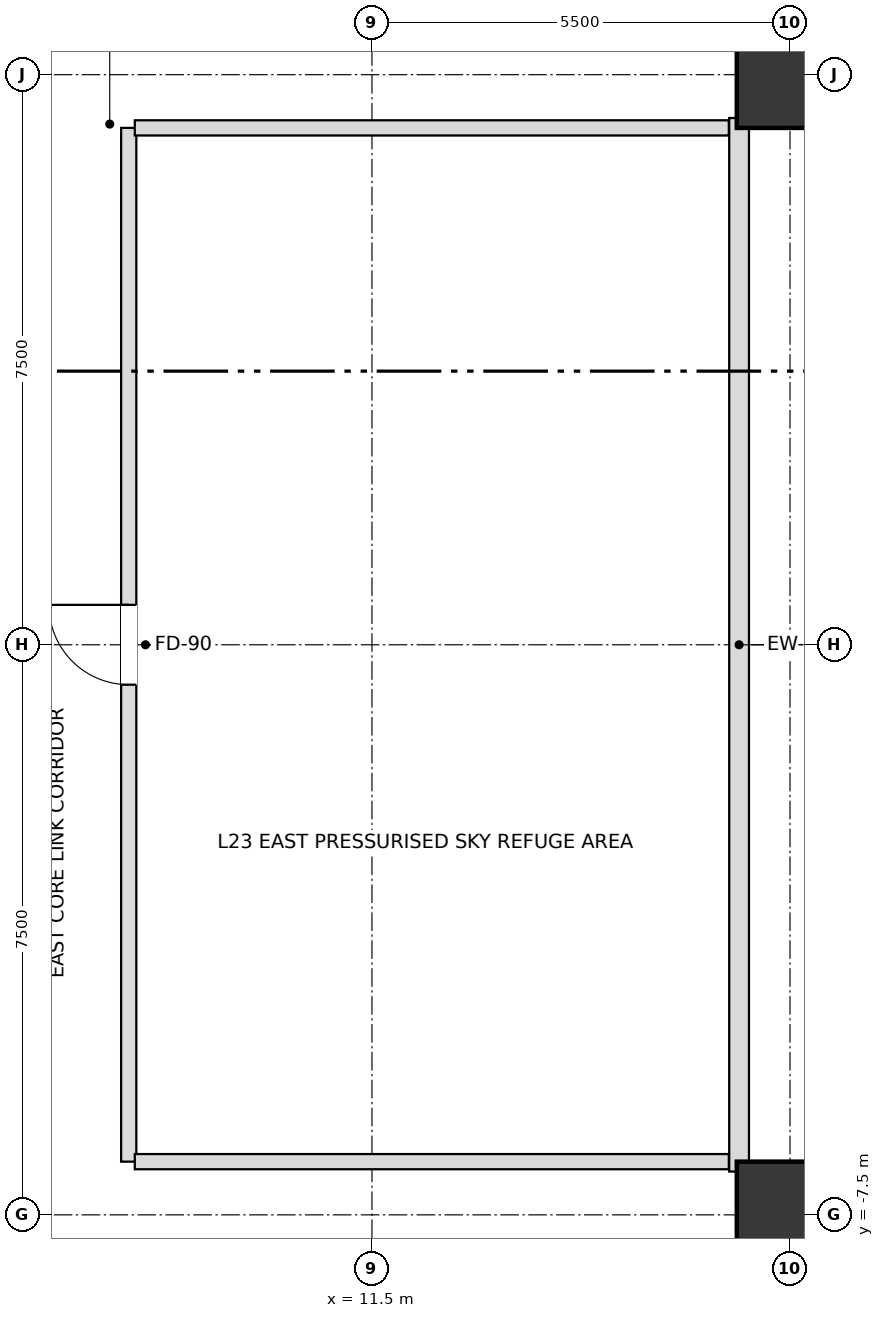
"""IFC4 building model, lengths in metres.
Left out: names, types, materials, properties, quantities, classifications, styles, units other than length and angle.
Written with IfcOpenShell. Run it as: python <this file> out.ifc"""

import sys

from ifc_helpers import new_model, si_unit, direction, frame, frame_2d, origin, origin_2d, place, context, subcontext, project, spatial, rectangle, extrude, element, fill, save


model = new_model("IFC4")
c1 = context("Model", 3, precision=1e-05, world=origin(), true_north=direction((0.0, 1.0)))
c2 = subcontext(c1, "Body", "Model", "MODEL_VIEW")
j1 = project(units=[si_unit("LENGTHUNIT", "METRE"), si_unit("PLANEANGLEUNIT", "RADIAN")], contexts=[c1])
p1 = place(None, origin())
s1 = spatial("IfcSite", under=j1, at=p1, CompositionType="ELEMENT")
p2 = place(p1, origin())
s2 = spatial("IfcBuilding", under=s1, at=p2, CompositionType="ELEMENT")
p3 = place(p2, frame((0.0, 0.0, 93.6)))
s3 = spatial("IfcBuildingStorey", under=s2, at=p3, CompositionType="ELEMENT", Elevation=93.6)
for number, where, z_axis, x_axis in (
    (1, (17.0, -7.5, 0.0), (0.0, 0.0, 1.0), (1.0, 0.0, 0.0)),
    (2, (17.0, 7.5, 0.0), (0.0, 0.0, 1.0), (1.0, 0.0, 0.0)),
):
    element("IfcColumn", number, at=place(p3, frame(where, z_axis=z_axis, x_axis=x_axis)), inside=s3, PredefinedType="USERDEFINED", context=c2, shape_type="SweptSolid", body=[
        extrude(rectangle(XDim=1.4, YDim=1.4, at=origin_2d()), origin(), (0.0, 0.0, 1.0), 5.4),
    ])
p4 = place(p3, frame((16.33, -6.93, 0.0), z_axis=(0.0, 0.0, 1.0), x_axis=(0.0, 1.0, 0.0)))
e3 = element("IfcWall", 3, at=p4, inside=s3, PredefinedType="SOLIDWALL", context=c2, shape_type="SweptSolid", body=[
    extrude(rectangle(XDim=13.86, YDim=0.26, at=frame_2d((6.93, 0.0))), origin(), (0.0, 0.0, 1.0), 5.1),
])
p5 = place(p3, frame((8.3, -6.8, 0.0), z_axis=(0.0, 0.0, 1.0), x_axis=(0.0, 1.0, 0.0)))
e4 = element("IfcWall", 4, at=p5, inside=s3, PredefinedType="SOLIDWALL", context=c2, shape_type="SweptSolid", body=[
    extrude(rectangle(XDim=13.6, YDim=0.2, at=frame_2d((6.8, 0.0))), origin(), (0.0, 0.0, 1.0), 5.1),
])
p6 = place(p5, frame((6.275, 0.0, 0.0)))
e5 = element("IfcOpeningElement", 5, at=p6, cuts=e4, PredefinedType="OPENING", context=c2, shape_type="SweptSolid", body=[
    extrude(rectangle(XDim=1.05, YDim=2.15, at=frame_2d((0.525, 1.075))), frame((0.0, 0.11, 0.0), z_axis=(0.0, -1.0, 0.0), x_axis=(1.0, 0.0, 0.0)), (0.0, 0.0, 1.0), 0.22),
])
for number, where, z_axis, x_axis in (
    (6, (8.38, -6.8, 0.0), (0.0, 0.0, 1.0), (1.0, 0.0, 0.0)),
    (7, (8.38, 6.8, 0.0), (0.0, 0.0, 1.0), (1.0, 0.0, 0.0)),
):
    element("IfcWall", number, at=place(p3, frame(where, z_axis=z_axis, x_axis=x_axis)), inside=s3, PredefinedType="SOLIDWALL", context=c2, shape_type="SweptSolid", body=[
        extrude(rectangle(XDim=7.815, YDim=0.2, at=frame_2d((3.908, 0.0))), origin(), (0.0, 0.0, 1.0), 5.1),
    ])
p7 = place(p6, origin())
e8 = element("IfcDoor", 8, at=p7, inside=s3, OperationType="SINGLE_SWING_RIGHT", PredefinedType="DOOR", context=c2, shape_type="SweptSolid", body=[
    extrude(rectangle(XDim=1.05, YDim=2.15, at=frame_2d((0.525, 1.075))), frame((0.0, 0.025, 0.0), z_axis=(0.0, -1.0, 0.0), x_axis=(1.0, 0.0, 0.0)), (0.0, 0.0, 1.0), 0.05),
])
fill(e5, e8)
save(model, sys.argv[1])
